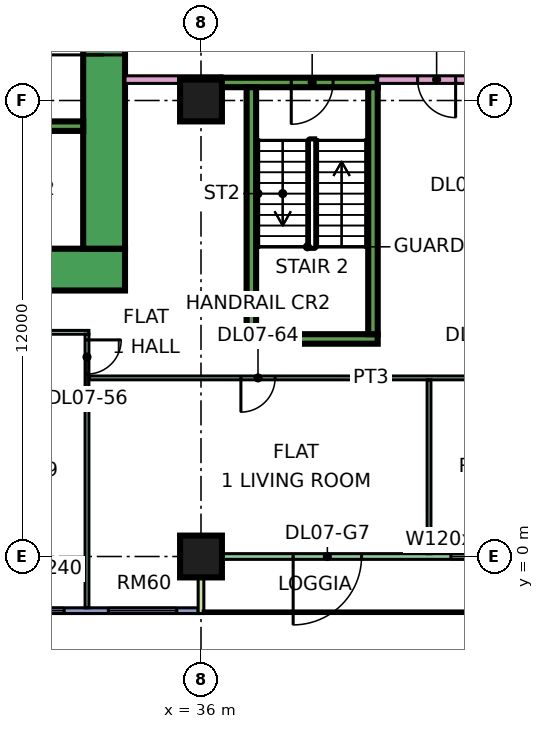
"""IFC4 building model, lengths in metres.
Left out: names, types, materials, properties, quantities, classifications, styles, units other than length and angle.
Written with IfcOpenShell. Run it as: python <this file> out.ifc"""

import sys

from ifc_helpers import new_model, si_unit, direction, frame, frame_2d, origin, origin_2d, place, context, subcontext, project, spatial, rectangle, extrude, element, fill, save


model = new_model("IFC4")
c1 = context("Model", 3, precision=1e-05, world=origin(), true_north=direction((0.0, 1.0)))
c2 = subcontext(c1, "Body", "Model", "MODEL_VIEW")
j1 = project(units=[si_unit("LENGTHUNIT", "METRE"), si_unit("PLANEANGLEUNIT", "RADIAN")], contexts=[c1])
p1 = place(None, origin())
s1 = spatial("IfcSite", under=j1, at=p1, CompositionType="ELEMENT")
p2 = place(p1, origin())
s2 = spatial("IfcBuilding", under=s1, at=p2, CompositionType="ELEMENT")
p3 = place(p2, frame((0.0, 0.0, 41.4)))
s3 = spatial("IfcBuildingStorey", under=s2, at=p3, CompositionType="ELEMENT", Elevation=41.4)
for number, where, z_axis, x_axis in (
    (1, (36.0, 0.0, 0.0), (0.0, 0.0, 1.0), (1.0, 0.0, 0.0)),
    (2, (36.0, 12.0, 0.0), (0.0, 0.0, 1.0), (1.0, 0.0, 0.0)),
):
    element("IfcColumn", number, at=place(p3, frame(where, z_axis=z_axis, x_axis=x_axis)), inside=s3, PredefinedType="COLUMN", context=c2, shape_type="SweptSolid", body=[
        extrude(rectangle(XDim=1.1, YDim=1.1, at=origin_2d()), origin(), (0.0, 0.0, 1.0), 3.75),
    ])
p4 = place(p3, frame((9.0, 7.55, 0.0), z_axis=(0.0, 0.0, 1.0), x_axis=(1.0, 0.0, 0.0)))
e3 = element("IfcWall", 3, at=p4, inside=s3, PredefinedType="SHEAR", context=c2, shape_type="SweptSolid", body=[
    extrude(rectangle(XDim=25.0, YDim=1.1, at=frame_2d((12.5, 0.0))), origin(), (0.0, 0.0, 1.0), 3.75),
])
p5 = place(p3, frame((33.45, 8.1, 0.0), z_axis=(0.0, 0.0, 1.0), x_axis=(0.0, 1.0, 0.0)))
e4 = element("IfcWall", 4, at=p5, inside=s3, PredefinedType="SHEAR", context=c2, shape_type="SweptSolid", body=[
    extrude(rectangle(XDim=10.8, YDim=1.1, at=frame_2d((5.4, 0.0))), origin(), (0.0, 0.0, 1.0), 3.75),
])
p6 = place(p5, frame((5.1, 0.0, 0.0)))
e5 = element("IfcOpeningElement", 5, at=p6, cuts=e4, PredefinedType="OPENING", context=c2, shape_type="SweptSolid", body=[
    extrude(rectangle(XDim=1.8, YDim=2.4, at=frame_2d((0.9, 1.2))), frame((0.0, 0.56, 0.0), z_axis=(0.0, -1.0, 0.0), x_axis=(1.0, 0.0, 0.0)), (0.0, 0.0, 1.0), 1.12),
])
p7 = place(p3, frame((13.45, 11.325, 0.0), z_axis=(0.0, 0.0, 1.0), x_axis=(1.0, 0.0, 0.0)))
e6 = element("IfcWall", 6, at=p7, inside=s3, PredefinedType="SHEAR", context=c2, shape_type="SweptSolid", body=[
    extrude(rectangle(XDim=19.45, YDim=0.25, at=frame_2d((9.725, 0.0))), origin(), (0.0, 0.0, 1.0), 3.75),
])
p8 = place(p7, frame((0.65, 0.0, 0.0)))
e7 = element("IfcOpeningElement", 7, at=p8, cuts=e6, PredefinedType="OPENING", context=c2, shape_type="SweptSolid", body=[
    extrude(rectangle(XDim=1.2, YDim=2.2, at=frame_2d((0.6, 1.1))), frame((0.0, 0.135, 0.0), z_axis=(0.0, -1.0, 0.0), x_axis=(1.0, 0.0, 0.0)), (0.0, 0.0, 1.0), 0.27),
])
p9 = place(p7, frame((3.4, 0.0, 0.0)))
e8 = element("IfcOpeningElement", 8, at=p9, cuts=e6, PredefinedType="OPENING", context=c2, shape_type="SweptSolid", body=[
    extrude(rectangle(XDim=1.2, YDim=2.2, at=frame_2d((0.6, 1.1))), frame((0.0, 0.135, 0.0), z_axis=(0.0, -1.0, 0.0), x_axis=(1.0, 0.0, 0.0)), (0.0, 0.0, 1.0), 0.27),
])
p10 = place(p7, frame((6.15, 0.0, 0.0)))
e9 = element("IfcOpeningElement", 9, at=p10, cuts=e6, PredefinedType="OPENING", context=c2, shape_type="SweptSolid", body=[
    extrude(rectangle(XDim=1.2, YDim=2.2, at=frame_2d((0.6, 1.1))), frame((0.0, 0.135, 0.0), z_axis=(0.0, -1.0, 0.0), x_axis=(1.0, 0.0, 0.0)), (0.0, 0.0, 1.0), 0.27),
])
p11 = place(p7, frame((8.9, 0.0, 0.0)))
e10 = element("IfcOpeningElement", 10, at=p11, cuts=e6, PredefinedType="OPENING", context=c2, shape_type="SweptSolid", body=[
    extrude(rectangle(XDim=1.2, YDim=2.2, at=frame_2d((0.6, 1.1))), frame((0.0, 0.135, 0.0), z_axis=(0.0, -1.0, 0.0), x_axis=(1.0, 0.0, 0.0)), (0.0, 0.0, 1.0), 0.27),
])
p12 = place(p3, frame((37.2, 5.725, 0.0), z_axis=(0.0, 0.0, 1.0), x_axis=(1.0, 0.0, 0.0)))
e11 = element("IfcWall", 11, at=p12, inside=s3, PredefinedType="SHEAR", context=c2, shape_type="SweptSolid", body=[
    extrude(rectangle(XDim=3.45, YDim=0.25, at=frame_2d((1.725, 0.0))), origin(), (0.0, 0.0, 1.0), 3.75),
])
p13 = place(p3, frame((36.55, 12.475, 0.0), z_axis=(0.0, 0.0, 1.0), x_axis=(1.0, 0.0, 0.0)))
e12 = element("IfcWall", 12, at=p13, inside=s3, PredefinedType="SHEAR", context=c2, shape_type="SweptSolid", body=[
    extrude(rectangle(XDim=4.1, YDim=0.25, at=frame_2d((2.05, 0.0))), origin(), (0.0, 0.0, 1.0), 3.75),
])
p14 = place(p13, frame((1.825, 0.0, 0.0)))
e13 = element("IfcOpeningElement", 13, at=p14, cuts=e12, PredefinedType="OPENING", context=c2, shape_type="SweptSolid", body=[
    extrude(rectangle(XDim=1.1, YDim=2.2, at=frame_2d((0.55, 1.1))), frame((0.0, 0.135, 0.0), z_axis=(0.0, -1.0, 0.0), x_axis=(1.0, 0.0, 0.0)), (0.0, 0.0, 1.0), 0.27),
])
for number, where, z_axis, x_axis in (
    (14, (37.325, 5.85, 0.0), (0.0, 0.0, 1.0), (0.0, 1.0, 0.0)),
    (15, (40.525, 5.85, 0.0), (0.0, 0.0, 1.0), (0.0, 1.0, 0.0)),
):
    element("IfcWall", number, at=place(p3, frame(where, z_axis=z_axis, x_axis=x_axis)), inside=s3, PredefinedType="SHEAR", context=c2, shape_type="SweptSolid", body=[
        extrude(rectangle(XDim=6.5, YDim=0.25, at=frame_2d((3.25, 0.0))), origin(), (0.0, 0.0, 1.0), 3.75),
    ])
p15 = place(p3, frame((24.075, -1.425, 0.0), z_axis=(0.0, 0.0, 1.0), x_axis=(1.0, 0.0, 0.0)))
e16 = element("IfcWall", 16, at=p15, inside=s3, PredefinedType="SOLIDWALL", context=c2, shape_type="SweptSolid", body=[
    extrude(rectangle(XDim=11.85, YDim=0.15, at=frame_2d((5.925, 0.0))), origin(), (0.0, 0.0, 1.0), 3.35),
])
p16 = place(p15, frame((0.562, 0.0, 0.45)))
e17 = element("IfcOpeningElement", 17, at=p16, cuts=e16, PredefinedType="OPENING", context=c2, shape_type="SweptSolid", body=[
    extrude(rectangle(XDim=1.8, YDim=2.4, at=frame_2d((0.9, 1.2))), frame((0.0, 0.085, 0.0), z_axis=(0.0, -1.0, 0.0), x_axis=(1.0, 0.0, 0.0)), (0.0, 0.0, 1.0), 0.17),
])
p17 = place(p15, frame((3.525, 0.0, 0.45)))
e18 = element("IfcOpeningElement", 18, at=p17, cuts=e16, PredefinedType="OPENING", context=c2, shape_type="SweptSolid", body=[
    extrude(rectangle(XDim=1.8, YDim=2.4, at=frame_2d((0.9, 1.2))), frame((0.0, 0.085, 0.0), z_axis=(0.0, -1.0, 0.0), x_axis=(1.0, 0.0, 0.0)), (0.0, 0.0, 1.0), 0.17),
])
p18 = place(p15, frame((6.525, 0.0, 0.45)))
e19 = element("IfcOpeningElement", 19, at=p18, cuts=e16, PredefinedType="OPENING", context=c2, shape_type="SweptSolid", body=[
    extrude(rectangle(XDim=1.8, YDim=2.4, at=frame_2d((0.9, 1.2))), frame((0.0, 0.085, 0.0), z_axis=(0.0, -1.0, 0.0), x_axis=(1.0, 0.0, 0.0)), (0.0, 0.0, 1.0), 0.17),
])
p19 = place(p15, frame((9.488, 0.0, 0.45)))
e20 = element("IfcOpeningElement", 20, at=p19, cuts=e16, PredefinedType="OPENING", context=c2, shape_type="SweptSolid", body=[
    extrude(rectangle(XDim=1.8, YDim=2.4, at=frame_2d((0.9, 1.2))), frame((0.0, 0.085, 0.0), z_axis=(0.0, -1.0, 0.0), x_axis=(1.0, 0.0, 0.0)), (0.0, 0.0, 1.0), 0.17),
])
p20 = place(p3, frame((36.075, 0.0, 0.0), z_axis=(0.0, 0.0, 1.0), x_axis=(1.0, 0.0, 0.0)))
e21 = element("IfcWall", 21, at=p20, inside=s3, PredefinedType="SOLIDWALL", context=c2, shape_type="SweptSolid", body=[
    extrude(rectangle(XDim=11.85, YDim=0.15, at=frame_2d((5.925, 0.0))), origin(), (0.0, 0.0, 1.0), 3.35),
])
p21 = place(p20, frame((2.35, 0.0, 0.0)))
e22 = element("IfcOpeningElement", 22, at=p21, cuts=e21, PredefinedType="OPENING", context=c2, shape_type="SweptSolid", body=[
    extrude(rectangle(XDim=1.8, YDim=2.4, at=frame_2d((0.9, 1.2))), frame((0.0, 0.085, 0.0), z_axis=(0.0, -1.0, 0.0), x_axis=(1.0, 0.0, 0.0)), (0.0, 0.0, 1.0), 0.17),
])
p22 = place(p20, frame((6.5, 0.0, 0.45)))
e23 = element("IfcOpeningElement", 23, at=p22, cuts=e21, PredefinedType="OPENING", context=c2, shape_type="SweptSolid", body=[
    extrude(rectangle(XDim=1.2, YDim=2.4, at=frame_2d((0.6, 1.2))), frame((0.0, 0.085, 0.0), z_axis=(0.0, -1.0, 0.0), x_axis=(1.0, 0.0, 0.0)), (0.0, 0.0, 1.0), 0.17),
])
p23 = place(p20, frame((10.113, 0.0, 0.45)))
e24 = element("IfcOpeningElement", 24, at=p23, cuts=e21, PredefinedType="OPENING", context=c2, shape_type="SweptSolid", body=[
    extrude(rectangle(XDim=1.2, YDim=2.4, at=frame_2d((0.6, 1.2))), frame((0.0, 0.085, 0.0), z_axis=(0.0, -1.0, 0.0), x_axis=(1.0, 0.0, 0.0)), (0.0, 0.0, 1.0), 0.17),
])
p24 = place(p3, frame((36.0, -1.5, 0.0), z_axis=(0.0, 0.0, 1.0), x_axis=(0.0, 1.0, 0.0)))
e25 = element("IfcWall", 25, at=p24, inside=s3, PredefinedType="SOLIDWALL", context=c2, shape_type="SweptSolid", body=[
    extrude(rectangle(XDim=1.5, YDim=0.15, at=frame_2d((0.75, 0.0))), origin(), (0.0, 0.0, 1.0), 3.35),
])
p25 = place(p3, frame((11.95, 5.9, 0.0), z_axis=(0.0, 0.0, 1.0), x_axis=(1.0, 0.0, 0.0)))
e26 = element("IfcWall", 26, at=p25, inside=s3, PredefinedType="PARTITIONING", context=c2, shape_type="SweptSolid", body=[
    extrude(rectangle(XDim=21.1, YDim=0.1, at=frame_2d((10.55, 0.0))), origin(), (0.0, 0.0, 1.0), 3.35),
])
p26 = place(p25, frame((1.1, 0.0, 0.0)))
e27 = element("IfcOpeningElement", 27, at=p26, cuts=e26, PredefinedType="OPENING", context=c2, shape_type="SweptSolid", body=[
    extrude(rectangle(XDim=0.9, YDim=2.1, at=frame_2d((0.45, 1.05))), frame((0.0, 0.06, 0.0), z_axis=(0.0, -1.0, 0.0), x_axis=(1.0, 0.0, 0.0)), (0.0, 0.0, 1.0), 0.12),
])
p27 = place(p25, frame((4.1, 0.0, 0.0)))
e28 = element("IfcOpeningElement", 28, at=p27, cuts=e26, PredefinedType="OPENING", context=c2, shape_type="SweptSolid", body=[
    extrude(rectangle(XDim=0.9, YDim=2.1, at=frame_2d((0.45, 1.05))), frame((0.0, 0.06, 0.0), z_axis=(0.0, -1.0, 0.0), x_axis=(1.0, 0.0, 0.0)), (0.0, 0.0, 1.0), 0.12),
])
p28 = place(p25, frame((16.1, 0.0, 0.0)))
e29 = element("IfcOpeningElement", 29, at=p28, cuts=e26, PredefinedType="OPENING", context=c2, shape_type="SweptSolid", body=[
    extrude(rectangle(XDim=0.9, YDim=2.1, at=frame_2d((0.45, 1.05))), frame((0.0, 0.06, 0.0), z_axis=(0.0, -1.0, 0.0), x_axis=(1.0, 0.0, 0.0)), (0.0, 0.0, 1.0), 0.12),
])
p29 = place(p25, frame((10.1, 0.0, 0.0)))
e30 = element("IfcOpeningElement", 30, at=p29, cuts=e26, PredefinedType="OPENING", context=c2, shape_type="SweptSolid", body=[
    extrude(rectangle(XDim=0.9, YDim=2.1, at=frame_2d((0.45, 1.05))), frame((0.0, 0.06, 0.0), z_axis=(0.0, -1.0, 0.0), x_axis=(1.0, 0.0, 0.0)), (0.0, 0.0, 1.0), 0.12),
])
p30 = place(p3, frame((33.0, -1.35, 0.0), z_axis=(0.0, 0.0, 1.0), x_axis=(0.0, 1.0, 0.0)))
e31 = element("IfcWall", 31, at=p30, inside=s3, PredefinedType="PARTITIONING", context=c2, shape_type="SweptSolid", body=[
    extrude(rectangle(XDim=7.2, YDim=0.1, at=frame_2d((3.6, 0.0))), origin(), (0.0, 0.0, 1.0), 3.35),
])
p31 = place(p30, frame((6.15, 0.0, 0.0)))
e32 = element("IfcOpeningElement", 32, at=p31, cuts=e31, PredefinedType="OPENING", context=c2, shape_type="SweptSolid", body=[
    extrude(rectangle(XDim=0.9, YDim=2.1, at=frame_2d((0.45, 1.05))), frame((0.0, 0.06, 0.0), z_axis=(0.0, -1.0, 0.0), x_axis=(1.0, 0.0, 0.0)), (0.0, 0.0, 1.0), 0.12),
])
p32 = place(p3, frame((33.05, 4.7, 0.0), z_axis=(0.0, 0.0, 1.0), x_axis=(1.0, 0.0, 0.0)))
e33 = element("IfcWall", 33, at=p32, inside=s3, PredefinedType="PARTITIONING", context=c2, shape_type="SweptSolid", body=[
    extrude(rectangle(XDim=14.85, YDim=0.1, at=frame_2d((7.425, 0.0))), origin(), (0.0, 0.0, 1.0), 3.35),
])
p33 = place(p32, frame((10.0, 0.0, 0.0)))
e34 = element("IfcOpeningElement", 34, at=p33, cuts=e33, PredefinedType="OPENING", context=c2, shape_type="SweptSolid", body=[
    extrude(rectangle(XDim=0.9, YDim=2.1, at=frame_2d((0.45, 1.05))), frame((0.0, 0.06, 0.0), z_axis=(0.0, -1.0, 0.0), x_axis=(1.0, 0.0, 0.0)), (0.0, 0.0, 1.0), 0.12),
])
p34 = place(p32, frame((13.0, 0.0, 0.0)))
e35 = element("IfcOpeningElement", 35, at=p34, cuts=e33, PredefinedType="OPENING", context=c2, shape_type="SweptSolid", body=[
    extrude(rectangle(XDim=0.9, YDim=2.1, at=frame_2d((0.45, 1.05))), frame((0.0, 0.06, 0.0), z_axis=(0.0, -1.0, 0.0), x_axis=(1.0, 0.0, 0.0)), (0.0, 0.0, 1.0), 0.12),
])
p35 = place(p32, frame((4.0, 0.0, 0.0)))
e36 = element("IfcOpeningElement", 36, at=p35, cuts=e33, PredefinedType="OPENING", context=c2, shape_type="SweptSolid", body=[
    extrude(rectangle(XDim=0.9, YDim=2.1, at=frame_2d((0.45, 1.05))), frame((0.0, 0.06, 0.0), z_axis=(0.0, -1.0, 0.0), x_axis=(1.0, 0.0, 0.0)), (0.0, 0.0, 1.0), 0.12),
])
p36 = place(p3, frame((34.0, 12.55, 0.0), z_axis=(0.0, 0.0, 1.0), x_axis=(1.0, 0.0, 0.0)))
e37 = element("IfcWall", 37, at=p36, inside=s3, PredefinedType="PARTITIONING", context=c2, shape_type="SweptSolid", body=[
    extrude(rectangle(XDim=2.551, YDim=0.2, at=frame_2d((1.275, 0.0))), origin(), (0.0, 0.0, 1.0), 3.35),
])
p37 = place(p3, frame((40.65, 12.55, 0.0), z_axis=(0.0, 0.0, 1.0), x_axis=(1.0, 0.0, 0.0)))
e38 = element("IfcWall", 38, at=p37, inside=s3, PredefinedType="PARTITIONING", context=c2, shape_type="SweptSolid", body=[
    extrude(rectangle(XDim=31.276, YDim=0.2, at=frame_2d((15.638, 0.0))), origin(), (0.0, 0.0, 1.0), 3.35),
])
p38 = place(p37, frame((17.4, 0.0, 0.0)))
e39 = element("IfcOpeningElement", 39, at=p38, cuts=e38, PredefinedType="OPENING", context=c2, shape_type="SweptSolid", body=[
    extrude(rectangle(XDim=1.0, YDim=2.1, at=frame_2d((0.5, 1.05))), frame((0.0, 0.11, 0.0), z_axis=(0.0, -1.0, 0.0), x_axis=(1.0, 0.0, 0.0)), (0.0, 0.0, 1.0), 0.22),
])
p39 = place(p37, frame((26.25, 0.0, 0.0)))
e40 = element("IfcOpeningElement", 40, at=p39, cuts=e38, PredefinedType="OPENING", context=c2, shape_type="SweptSolid", body=[
    extrude(rectangle(XDim=1.0, YDim=2.1, at=frame_2d((0.5, 1.05))), frame((0.0, 0.11, 0.0), z_axis=(0.0, -1.0, 0.0), x_axis=(1.0, 0.0, 0.0)), (0.0, 0.0, 1.0), 0.22),
])
p40 = place(p37, frame((1.05, 0.0, 0.0)))
e41 = element("IfcOpeningElement", 41, at=p40, cuts=e38, PredefinedType="OPENING", context=c2, shape_type="SweptSolid", body=[
    extrude(rectangle(XDim=1.0, YDim=2.1, at=frame_2d((0.5, 1.05))), frame((0.0, 0.11, 0.0), z_axis=(0.0, -1.0, 0.0), x_axis=(1.0, 0.0, 0.0)), (0.0, 0.0, 1.0), 0.22),
])
p41 = place(p3, frame((42.0, 0.074, 0.0), z_axis=(0.0, 0.0, 1.0), x_axis=(0.0, 1.0, 0.0)))
e42 = element("IfcWall", 42, at=p41, inside=s3, PredefinedType="PARTITIONING", context=c2, shape_type="SweptSolid", body=[
    extrude(rectangle(XDim=4.576, YDim=0.1, at=frame_2d((2.288, 0.0))), origin(), (0.0, 0.0, 1.0), 3.35),
])
p42 = place(p18, origin())
e43 = element("IfcWindow", 43, at=p42, inside=s3, PartitioningType="SINGLE_PANEL", PredefinedType="WINDOW", context=c2, shape_type="SweptSolid", body=[
    extrude(rectangle(XDim=1.8, YDim=2.4, at=frame_2d((0.9, 1.2))), frame((0.0, 0.03, 0.0), z_axis=(0.0, -1.0, 0.0), x_axis=(1.0, 0.0, 0.0)), (0.0, 0.0, 1.0), 0.06),
])
fill(e19, e43)
p43 = place(p19, origin())
e44 = element("IfcWindow", 44, at=p43, inside=s3, PartitioningType="SINGLE_PANEL", PredefinedType="WINDOW", context=c2, shape_type="SweptSolid", body=[
    extrude(rectangle(XDim=1.8, YDim=2.4, at=frame_2d((0.9, 1.2))), frame((0.0, 0.03, 0.0), z_axis=(0.0, -1.0, 0.0), x_axis=(1.0, 0.0, 0.0)), (0.0, 0.0, 1.0), 0.06),
])
fill(e20, e44)
p44 = place(p21, frame((1.8, 0.0, 0.0), z_axis=(0.0, 0.0, 1.0), x_axis=(-1.0, 0.0, 0.0)))
e45 = element("IfcDoor", 45, at=p44, inside=s3, OperationType="DOUBLE_DOOR_SINGLE_SWING", PredefinedType="DOOR", context=c2, shape_type="SweptSolid", body=[
    extrude(rectangle(XDim=1.8, YDim=2.4, at=frame_2d((0.9, 1.2))), frame((0.0, 0.025, 0.0), z_axis=(0.0, -1.0, 0.0), x_axis=(1.0, 0.0, 0.0)), (0.0, 0.0, 1.0), 0.05),
])
fill(e22, e45)
p45 = place(p22, origin())
e46 = element("IfcWindow", 46, at=p45, inside=s3, PartitioningType="SINGLE_PANEL", PredefinedType="WINDOW", context=c2, shape_type="SweptSolid", body=[
    extrude(rectangle(XDim=1.2, YDim=2.4, at=frame_2d((0.6, 1.2))), frame((0.0, 0.03, 0.0), z_axis=(0.0, -1.0, 0.0), x_axis=(1.0, 0.0, 0.0)), (0.0, 0.0, 1.0), 0.06),
])
fill(e23, e46)
p46 = place(p6, origin())
e47 = element("IfcDoor", 47, at=p46, inside=s3, OperationType="DOUBLE_DOOR_SINGLE_SWING", PredefinedType="DOOR", context=c2, shape_type="SweptSolid", body=[
    extrude(rectangle(XDim=1.8, YDim=2.4, at=frame_2d((0.9, 1.2))), frame((0.0, 0.025, 0.0), z_axis=(0.0, -1.0, 0.0), x_axis=(1.0, 0.0, 0.0)), (0.0, 0.0, 1.0), 0.05),
])
fill(e5, e47)
p47 = place(p14, frame((1.1, 0.0, 0.0), z_axis=(0.0, 0.0, 1.0), x_axis=(-1.0, 0.0, 0.0)))
e48 = element("IfcDoor", 48, at=p47, inside=s3, OperationType="SINGLE_SWING_LEFT", PredefinedType="DOOR", context=c2, shape_type="SweptSolid", body=[
    extrude(rectangle(XDim=1.1, YDim=2.2, at=frame_2d((0.55, 1.1))), frame((0.0, 0.025, 0.0), z_axis=(0.0, -1.0, 0.0), x_axis=(1.0, 0.0, 0.0)), (0.0, 0.0, 1.0), 0.05),
])
fill(e13, e48)
p48 = place(p31, origin())
e49 = element("IfcDoor", 49, at=p48, inside=s3, OperationType="SINGLE_SWING_RIGHT", PredefinedType="DOOR", context=c2, shape_type="SweptSolid", body=[
    extrude(rectangle(XDim=0.9, YDim=2.1, at=frame_2d((0.45, 1.05))), frame((0.0, 0.025, 0.0), z_axis=(0.0, -1.0, 0.0), x_axis=(1.0, 0.0, 0.0)), (0.0, 0.0, 1.0), 0.05),
])
fill(e32, e49)
p49 = place(p40, origin())
e50 = element("IfcDoor", 50, at=p49, inside=s3, OperationType="SINGLE_SWING_RIGHT", PredefinedType="DOOR", context=c2, shape_type="SweptSolid", body=[
    extrude(rectangle(XDim=1.0, YDim=2.1, at=frame_2d((0.5, 1.05))), frame((0.0, 0.025, 0.0), z_axis=(0.0, -1.0, 0.0), x_axis=(1.0, 0.0, 0.0)), (0.0, 0.0, 1.0), 0.05),
])
fill(e41, e50)
p50 = place(p35, frame((0.9, 0.0, 0.0), z_axis=(0.0, 0.0, 1.0), x_axis=(-1.0, 0.0, 0.0)))
e51 = element("IfcDoor", 51, at=p50, inside=s3, OperationType="SINGLE_SWING_LEFT", PredefinedType="DOOR", context=c2, shape_type="SweptSolid", body=[
    extrude(rectangle(XDim=0.9, YDim=2.1, at=frame_2d((0.45, 1.05))), frame((0.0, 0.025, 0.0), z_axis=(0.0, -1.0, 0.0), x_axis=(1.0, 0.0, 0.0)), (0.0, 0.0, 1.0), 0.05),
])
fill(e36, e51)
save(model, sys.argv[1])
